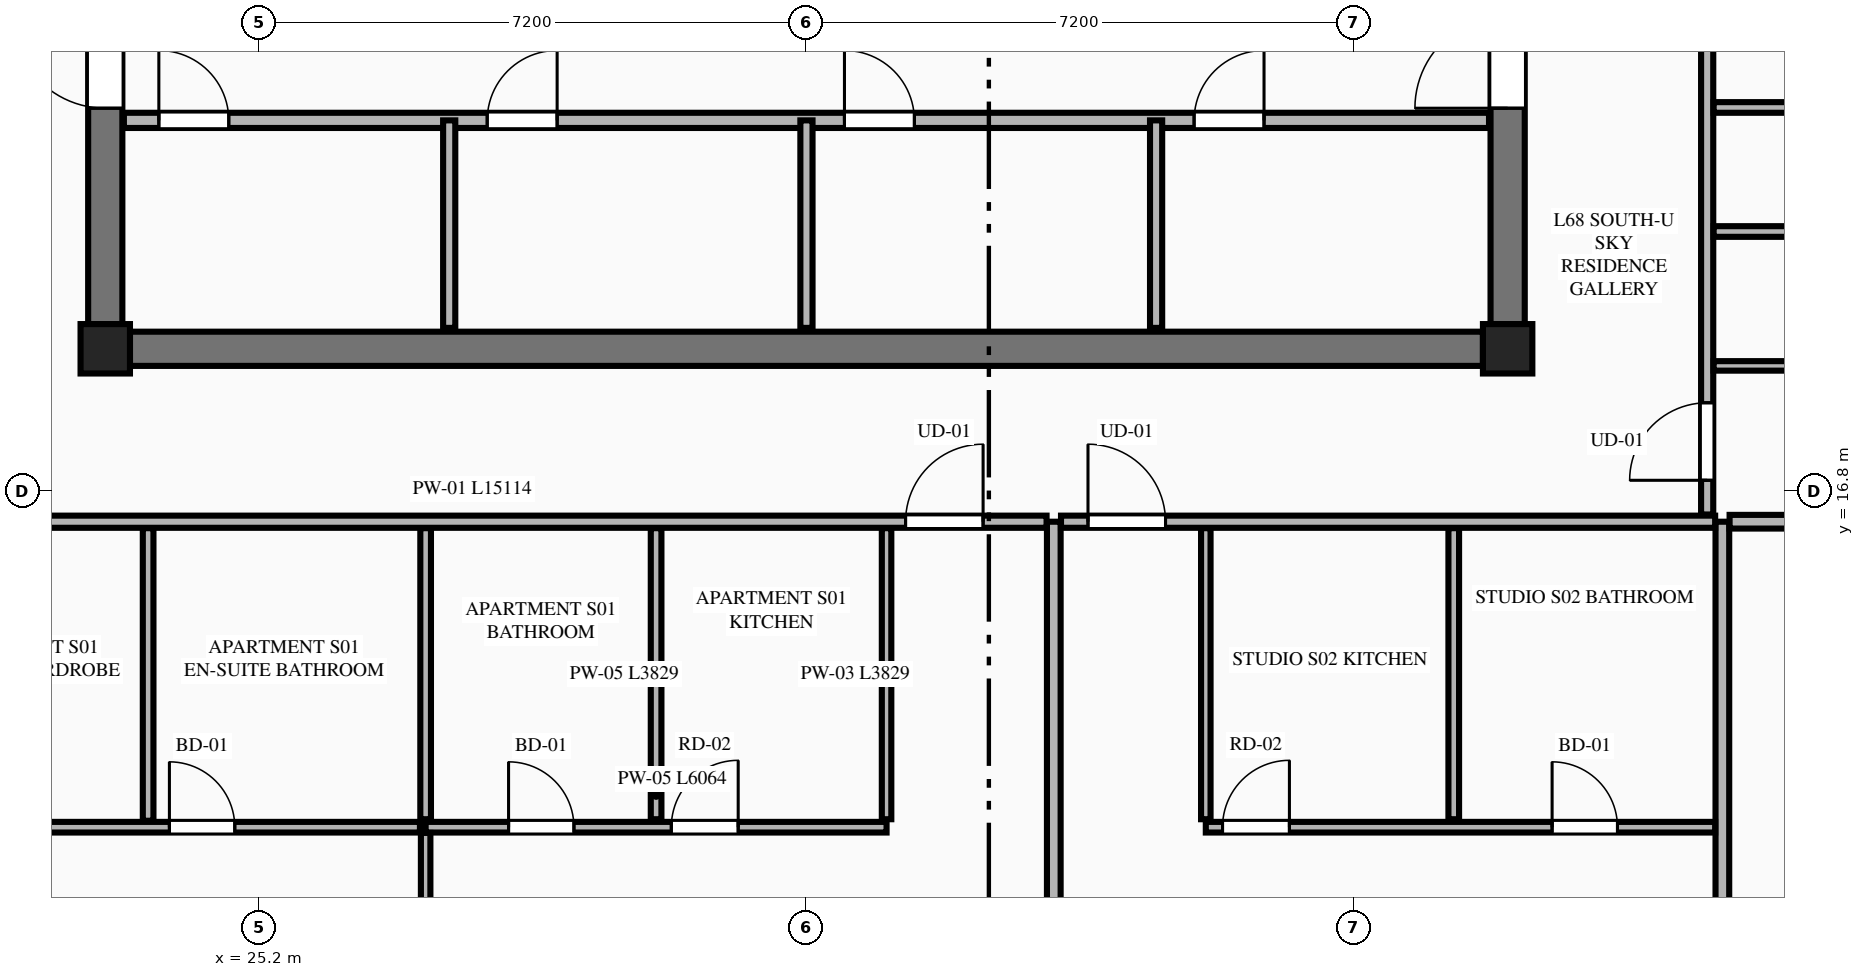
"""IFC4 building model, lengths in metres.
Left out: names, types, materials, properties, quantities, classifications, styles, units other than length and angle.
Written with IfcOpenShell. Run it as: python <this file> out.ifc"""

import sys

from ifc_helpers import new_model, si_unit, direction, frame, frame_2d, origin, origin_2d, place, context, subcontext, project, spatial, rectangle, extrude, element, fill, save


model = new_model("IFC4")
c1 = context("Model", 3, precision=1e-05, world=origin(), true_north=direction((0.0, 1.0)))
c2 = subcontext(c1, "Body", "Model", "MODEL_VIEW")
j1 = project(units=[si_unit("LENGTHUNIT", "METRE"), si_unit("PLANEANGLEUNIT", "RADIAN")], contexts=[c1])
p1 = place(None, origin())
s1 = spatial("IfcSite", under=j1, at=p1, CompositionType="ELEMENT")
p2 = place(p1, origin())
s2 = spatial("IfcBuilding", under=s1, at=p2, CompositionType="ELEMENT")
p3 = place(p2, frame((0.0, 0.0, 256.2)))
s3 = spatial("IfcBuildingStorey", under=s2, at=p3, CompositionType="ELEMENT", Elevation=256.2)
for number, where, z_axis, x_axis in (
    (1, (23.175, 18.675, 0.0), (0.0, 0.0, 1.0), (1.0, 0.0, 0.0)),
    (2, (41.625, 18.675, 0.0), (0.0, 0.0, 1.0), (1.0, 0.0, 0.0)),
):
    element("IfcColumn", number, at=place(p3, frame(where, z_axis=z_axis, x_axis=x_axis)), inside=s3, PredefinedType="COLUMN", context=c2, shape_type="SweptSolid", body=[
        extrude(rectangle(XDim=0.65, YDim=0.65, at=origin_2d()), origin(), (0.0, 0.0, 1.0), 3.65),
    ])
p4 = place(p3, frame((23.5, 18.675, 0.0), z_axis=(0.0, 0.0, 1.0), x_axis=(1.0, 0.0, 0.0)))
e3 = element("IfcWall", 3, at=p4, inside=s3, PredefinedType="SHEAR", context=c2, shape_type="SweptSolid", body=[
    extrude(rectangle(XDim=17.8, YDim=0.45, at=frame_2d((8.9, 0.0))), origin(), (0.0, 0.0, 1.0), 3.45),
])
p5 = place(p3, frame((23.175, 19.0, 0.0), z_axis=(0.0, 0.0, 1.0), x_axis=(0.0, 1.0, 0.0)))
e4 = element("IfcWall", 4, at=p5, inside=s3, PredefinedType="SHEAR", context=c2, shape_type="SweptSolid", body=[
    extrude(rectangle(XDim=13.8, YDim=0.45, at=frame_2d((6.9, 0.0))), origin(), (0.0, 0.0, 1.0), 3.45),
])
p6 = place(p5, frame((2.84, 0.0, 0.0)))
e5 = element("IfcOpeningElement", 5, at=p6, cuts=e4, PredefinedType="OPENING", context=c2, shape_type="SweptSolid", body=[
    extrude(rectangle(XDim=1.22, YDim=2.25, at=frame_2d((0.61, 1.125))), frame((0.0, 0.235, 0.0), z_axis=(0.0, -1.0, 0.0), x_axis=(1.0, 0.0, 0.0)), (0.0, 0.0, 1.0), 0.47),
])
p7 = place(p3, frame((41.625, 19.0, 0.0), z_axis=(0.0, 0.0, 1.0), x_axis=(0.0, 1.0, 0.0)))
e6 = element("IfcWall", 6, at=p7, inside=s3, PredefinedType="SHEAR", context=c2, shape_type="SweptSolid", body=[
    extrude(rectangle(XDim=13.8, YDim=0.45, at=frame_2d((6.9, 0.0))), origin(), (0.0, 0.0, 1.0), 3.45),
])
p8 = place(p7, frame((2.84, 0.0, 0.0)))
e7 = element("IfcOpeningElement", 7, at=p8, cuts=e6, PredefinedType="OPENING", context=c2, shape_type="SweptSolid", body=[
    extrude(rectangle(XDim=1.22, YDim=2.25, at=frame_2d((0.61, 1.125))), frame((0.0, 0.235, 0.0), z_axis=(0.0, -1.0, 0.0), x_axis=(1.0, 0.0, 0.0)), (0.0, 0.0, 1.0), 0.47),
])
p9 = place(p3, frame((23.42, 21.68, 0.0), z_axis=(0.0, 0.0, 1.0), x_axis=(1.0, 0.0, 0.0)))
e8 = element("IfcWall", 8, at=p9, inside=s3, PredefinedType="PLUMBINGWALL", context=c2, shape_type="SweptSolid", body=[
    extrude(rectangle(XDim=17.96, YDim=0.2, at=frame_2d((8.98, 0.0))), origin(), (0.0, 0.0, 1.0), 3.45),
])
p10 = place(p9, frame((0.46, 0.0, 0.0)))
e9 = element("IfcOpeningElement", 9, at=p10, cuts=e8, PredefinedType="OPENING", context=c2, shape_type="SweptSolid", body=[
    extrude(rectangle(XDim=0.92, YDim=2.15, at=frame_2d((0.46, 1.075))), frame((0.0, 0.11, 0.0), z_axis=(0.0, -1.0, 0.0), x_axis=(1.0, 0.0, 0.0)), (0.0, 0.0, 1.0), 0.22),
])
p11 = place(p9, frame((4.78, 0.0, 0.0)))
e10 = element("IfcOpeningElement", 10, at=p11, cuts=e8, PredefinedType="OPENING", context=c2, shape_type="SweptSolid", body=[
    extrude(rectangle(XDim=0.92, YDim=2.15, at=frame_2d((0.46, 1.075))), frame((0.0, 0.11, 0.0), z_axis=(0.0, -1.0, 0.0), x_axis=(1.0, 0.0, 0.0)), (0.0, 0.0, 1.0), 0.22),
])
p12 = place(p9, frame((9.48, 0.0, 0.0)))
e11 = element("IfcOpeningElement", 11, at=p12, cuts=e8, PredefinedType="OPENING", context=c2, shape_type="SweptSolid", body=[
    extrude(rectangle(XDim=0.92, YDim=2.15, at=frame_2d((0.46, 1.075))), frame((0.0, 0.11, 0.0), z_axis=(0.0, -1.0, 0.0), x_axis=(1.0, 0.0, 0.0)), (0.0, 0.0, 1.0), 0.22),
])
p13 = place(p9, frame((14.08, 0.0, 0.0)))
e12 = element("IfcOpeningElement", 12, at=p13, cuts=e8, PredefinedType="OPENING", context=c2, shape_type="SweptSolid", body=[
    extrude(rectangle(XDim=0.92, YDim=2.15, at=frame_2d((0.46, 1.075))), frame((0.0, 0.11, 0.0), z_axis=(0.0, -1.0, 0.0), x_axis=(1.0, 0.0, 0.0)), (0.0, 0.0, 1.0), 0.22),
])
for number, where, z_axis, x_axis in (
    (13, (27.7, 18.95, 0.0), (0.0, 0.0, 1.0), (0.0, 1.0, 0.0)),
    (14, (32.4, 18.95, 0.0), (0.0, 0.0, 1.0), (0.0, 1.0, 0.0)),
    (15, (37.0, 18.95, 0.0), (0.0, 0.0, 1.0), (0.0, 1.0, 0.0)),
):
    element("IfcWall", number, at=place(p3, frame(where, z_axis=z_axis, x_axis=x_axis)), inside=s3, PredefinedType="PARTITIONING", context=c2, shape_type="SweptSolid", body=[
        extrude(rectangle(XDim=2.73, YDim=0.16, at=frame_2d((1.365, 0.0))), origin(), (0.0, 0.0, 1.0), 3.45),
    ])
p14 = place(p3, frame((35.654, 7.405, 0.0), z_axis=(0.0, 0.0, 1.0), x_axis=(0.0, 1.0, 0.0)))
e16 = element("IfcWall", 16, at=p14, inside=s3, PredefinedType="PARTITIONING", context=c2, shape_type="SweptSolid", body=[
    extrude(rectangle(XDim=8.995, YDim=0.18, at=frame_2d((4.498, 0.0))), origin(), (0.0, 0.0, 1.0), 2.907),
])
p15 = place(p3, frame((44.45, 8.119, 0.0), z_axis=(0.0, 0.0, 1.0), x_axis=(0.0, 1.0, 0.0)))
e17 = element("IfcWall", 17, at=p15, inside=s3, PredefinedType="PARTITIONING", context=c2, shape_type="SweptSolid", body=[
    extrude(rectangle(XDim=8.281, YDim=0.18, at=frame_2d((4.141, 0.0))), origin(), (0.0, 0.0, 1.0), 3.45),
])
p16 = place(p3, frame((20.445, 16.4, 0.0), z_axis=(0.0, 0.0, 1.0), x_axis=(1.0, 0.0, 0.0)))
e18 = element("IfcWall", 18, at=p16, inside=s3, PredefinedType="PARTITIONING", context=c2, shape_type="SweptSolid", body=[
    extrude(rectangle(XDim=15.114, YDim=0.16, at=frame_2d((7.557, 0.0))), origin(), (0.0, 0.0, 1.0), 3.45),
])
p17 = place(p16, frame((13.259, 0.0, 0.0)))
e19 = element("IfcOpeningElement", 19, at=p17, cuts=e18, PredefinedType="OPENING", context=c2, shape_type="SweptSolid", body=[
    extrude(rectangle(XDim=1.02, YDim=2.25, at=frame_2d((0.51, 1.125))), frame((0.0, 0.09, 0.0), z_axis=(0.0, -1.0, 0.0), x_axis=(1.0, 0.0, 0.0)), (0.0, 0.0, 1.0), 0.18),
])
p18 = place(p3, frame((33.454, 12.486, 0.0), z_axis=(0.0, 0.0, 1.0), x_axis=(0.0, 1.0, 0.0)))
e20 = element("IfcWall", 20, at=p18, inside=s3, PredefinedType="PARTITIONING", context=c2, shape_type="SweptSolid", body=[
    extrude(rectangle(XDim=3.829, YDim=0.125, at=frame_2d((1.915, 0.0))), origin(), (0.0, 0.0, 1.0), 3.45),
])
p19 = place(p3, frame((27.39, 12.381, 0.0), z_axis=(0.0, 0.0, 1.0), x_axis=(1.0, 0.0, 0.0)))
e21 = element("IfcWall", 21, at=p19, inside=s3, PredefinedType="PLUMBINGWALL", context=c2, shape_type="SweptSolid", body=[
    extrude(rectangle(XDim=6.064, YDim=0.14, at=frame_2d((3.032, 0.0))), origin(), (0.0, 0.0, 1.0), 3.45),
])
p20 = place(p19, frame((1.091, 0.0, 0.0)))
e22 = element("IfcOpeningElement", 22, at=p20, cuts=e21, PredefinedType="OPENING", context=c2, shape_type="SweptSolid", body=[
    extrude(rectangle(XDim=0.86, YDim=2.1, at=frame_2d((0.43, 1.05))), frame((0.0, 0.08, 0.0), z_axis=(0.0, -1.0, 0.0), x_axis=(1.0, 0.0, 0.0)), (0.0, 0.0, 1.0), 0.16),
])
p21 = place(p19, frame((3.232, 0.0, 0.0)))
e23 = element("IfcOpeningElement", 23, at=p21, cuts=e21, PredefinedType="OPENING", context=c2, shape_type="SweptSolid", body=[
    extrude(rectangle(XDim=0.88, YDim=2.15, at=frame_2d((0.44, 1.075))), frame((0.0, 0.08, 0.0), z_axis=(0.0, -1.0, 0.0), x_axis=(1.0, 0.0, 0.0)), (0.0, 0.0, 1.0), 0.16),
])
p22 = place(p3, frame((20.445, 12.381, 0.0), z_axis=(0.0, 0.0, 1.0), x_axis=(1.0, 0.0, 0.0)))
e24 = element("IfcWall", 24, at=p22, inside=s3, PredefinedType="PLUMBINGWALL", context=c2, shape_type="SweptSolid", body=[
    extrude(rectangle(XDim=6.87, YDim=0.14, at=frame_2d((3.435, 0.0))), origin(), (0.0, 0.0, 1.0), 3.45),
])
p23 = place(p22, frame((0.28, 0.0, 0.0)))
e25 = element("IfcOpeningElement", 25, at=p23, cuts=e24, PredefinedType="OPENING", context=c2, shape_type="SweptSolid", body=[
    extrude(rectangle(XDim=0.88, YDim=2.15, at=frame_2d((0.44, 1.075))), frame((0.0, 0.08, 0.0), z_axis=(0.0, -1.0, 0.0), x_axis=(1.0, 0.0, 0.0)), (0.0, 0.0, 1.0), 0.16),
])
p24 = place(p22, frame((3.574, 0.0, 0.0)))
e26 = element("IfcOpeningElement", 26, at=p24, cuts=e24, PredefinedType="OPENING", context=c2, shape_type="SweptSolid", body=[
    extrude(rectangle(XDim=0.86, YDim=2.1, at=frame_2d((0.43, 1.05))), frame((0.0, 0.08, 0.0), z_axis=(0.0, -1.0, 0.0), x_axis=(1.0, 0.0, 0.0)), (0.0, 0.0, 1.0), 0.16),
])
for number, where, z_axis, x_axis in (
    (27, (30.422, 12.486, 0.0), (0.0, 0.0, 1.0), (0.0, 1.0, 0.0)),
    (28, (27.39, 12.486, 0.0), (0.0, 0.0, 1.0), (0.0, 1.0, 0.0)),
):
    element("IfcWall", number, at=place(p3, frame(where, z_axis=z_axis, x_axis=x_axis)), inside=s3, PredefinedType="PLUMBINGWALL", context=c2, shape_type="SweptSolid", body=[
        extrude(rectangle(XDim=3.829, YDim=0.14, at=frame_2d((1.915, 0.0))), origin(), (0.0, 0.0, 1.0), 3.45),
    ])
p25 = place(p3, frame((27.39, 7.315, 0.0), z_axis=(0.0, 0.0, 1.0), x_axis=(0.0, 1.0, 0.0)))
e29 = element("IfcWall", 29, at=p25, inside=s3, PredefinedType="PARTITIONING", context=c2, shape_type="SweptSolid", body=[
    extrude(rectangle(XDim=4.991, YDim=0.125, at=frame_2d((2.496, 0.0))), origin(), (0.0, 0.0, 1.0), 3.45),
])
p26 = place(p25, frame((0.35, 0.0, 0.0)))
e30 = element("IfcOpeningElement", 30, at=p26, cuts=e29, PredefinedType="OPENING", context=c2, shape_type="SweptSolid", body=[
    extrude(rectangle(XDim=0.92, YDim=2.15, at=frame_2d((0.46, 1.075))), frame((0.0, 0.073, 0.0), z_axis=(0.0, -1.0, 0.0), x_axis=(1.0, 0.0, 0.0)), (0.0, 0.0, 1.0), 0.145),
])
p27 = place(p3, frame((23.739, 12.466, 0.0), z_axis=(0.0, 0.0, 1.0), x_axis=(0.0, 1.0, 0.0)))
e31 = element("IfcWall", 31, at=p27, inside=s3, PredefinedType="PLUMBINGWALL", context=c2, shape_type="SweptSolid", body=[
    extrude(rectangle(XDim=3.849, YDim=0.14, at=frame_2d((1.924, 0.0))), origin(), (0.0, 0.0, 1.0), 3.45),
])
p28 = place(p3, frame((35.749, 16.4, 0.0), z_axis=(0.0, 0.0, 1.0), x_axis=(1.0, 0.0, 0.0)))
e32 = element("IfcWall", 32, at=p28, inside=s3, PredefinedType="PARTITIONING", context=c2, shape_type="SweptSolid", body=[
    extrude(rectangle(XDim=8.606, YDim=0.16, at=frame_2d((4.303, 0.0))), origin(), (0.0, 0.0, 1.0), 3.45),
])
p29 = place(p28, frame((0.355, 0.0, 0.0)))
e33 = element("IfcOpeningElement", 33, at=p29, cuts=e32, PredefinedType="OPENING", context=c2, shape_type="SweptSolid", body=[
    extrude(rectangle(XDim=1.02, YDim=2.25, at=frame_2d((0.51, 1.125))), frame((0.0, 0.09, 0.0), z_axis=(0.0, -1.0, 0.0), x_axis=(1.0, 0.0, 0.0)), (0.0, 0.0, 1.0), 0.18),
])
p30 = place(p3, frame((37.654, 12.486, 0.0), z_axis=(0.0, 0.0, 1.0), x_axis=(0.0, 1.0, 0.0)))
e34 = element("IfcWall", 34, at=p30, inside=s3, PredefinedType="PARTITIONING", context=c2, shape_type="SweptSolid", body=[
    extrude(rectangle(XDim=3.829, YDim=0.125, at=frame_2d((1.915, 0.0))), origin(), (0.0, 0.0, 1.0), 3.45),
])
p31 = place(p3, frame((37.654, 12.381, 0.0), z_axis=(0.0, 0.0, 1.0), x_axis=(1.0, 0.0, 0.0)))
e35 = element("IfcWall", 35, at=p31, inside=s3, PredefinedType="PLUMBINGWALL", context=c2, shape_type="SweptSolid", body=[
    extrude(rectangle(XDim=6.701, YDim=0.14, at=frame_2d((3.351, 0.0))), origin(), (0.0, 0.0, 1.0), 3.45),
])
p32 = place(p31, frame((4.556, 0.0, 0.0)))
e36 = element("IfcOpeningElement", 36, at=p32, cuts=e35, PredefinedType="OPENING", context=c2, shape_type="SweptSolid", body=[
    extrude(rectangle(XDim=0.86, YDim=2.1, at=frame_2d((0.43, 1.05))), frame((0.0, 0.08, 0.0), z_axis=(0.0, -1.0, 0.0), x_axis=(1.0, 0.0, 0.0)), (0.0, 0.0, 1.0), 0.16),
])
p33 = place(p31, frame((0.22, 0.0, 0.0)))
e37 = element("IfcOpeningElement", 37, at=p33, cuts=e35, PredefinedType="OPENING", context=c2, shape_type="SweptSolid", body=[
    extrude(rectangle(XDim=0.88, YDim=2.15, at=frame_2d((0.44, 1.075))), frame((0.0, 0.08, 0.0), z_axis=(0.0, -1.0, 0.0), x_axis=(1.0, 0.0, 0.0)), (0.0, 0.0, 1.0), 0.16),
])
p34 = place(p3, frame((40.916, 12.486, 0.0), z_axis=(0.0, 0.0, 1.0), x_axis=(0.0, 1.0, 0.0)))
e38 = element("IfcWall", 38, at=p34, inside=s3, PredefinedType="PLUMBINGWALL", context=c2, shape_type="SweptSolid", body=[
    extrude(rectangle(XDim=3.829, YDim=0.14, at=frame_2d((1.915, 0.0))), origin(), (0.0, 0.0, 1.0), 3.45),
])
p35 = place(p3, frame((44.545, 16.4, 0.0), z_axis=(0.0, 0.0, 1.0), x_axis=(1.0, 0.0, 0.0)))
e39 = element("IfcWall", 39, at=p35, inside=s3, PredefinedType="PARTITIONING", context=c2, shape_type="SweptSolid", body=[
    extrude(rectangle(XDim=4.221, YDim=0.18, at=frame_2d((2.111, 0.0))), origin(), (0.0, 0.0, 1.0), 3.45),
])
p36 = place(p3, frame((44.25, 16.495, 0.0), z_axis=(0.0, 0.0, 1.0), x_axis=(0.0, 1.0, 0.0)))
e40 = element("IfcWall", 40, at=p36, inside=s3, PredefinedType="PARTITIONING", context=c2, shape_type="SweptSolid", body=[
    extrude(rectangle(XDim=9.854, YDim=0.16, at=frame_2d((4.927, 0.0))), origin(), (0.0, 0.0, 1.0), 3.137),
])
p37 = place(p36, frame((0.45, 0.0, 0.0)))
e41 = element("IfcOpeningElement", 41, at=p37, cuts=e40, PredefinedType="OPENING", context=c2, shape_type="SweptSolid", body=[
    extrude(rectangle(XDim=1.02, YDim=2.25, at=frame_2d((0.51, 1.125))), frame((0.0, 0.09, 0.0), z_axis=(0.0, -1.0, 0.0), x_axis=(1.0, 0.0, 0.0)), (0.0, 0.0, 1.0), 0.18),
])
p38 = place(p3, frame((44.335, 18.45, 0.0), z_axis=(0.0, 0.0, 1.0), x_axis=(1.0, 0.0, 0.0)))
e42 = element("IfcWall", 42, at=p38, inside=s3, PredefinedType="PARTITIONING", context=c2, shape_type="SweptSolid", body=[
    extrude(rectangle(XDim=2.38, YDim=0.125, at=frame_2d((1.19, 0.0))), origin(), (0.0, 0.0, 1.0), 3.45),
])
for number, where, z_axis, x_axis in (
    (43, (44.335, 21.85, 0.0), (0.0, 0.0, 1.0), (1.0, 0.0, 0.0)),
    (44, (44.335, 20.218, 0.0), (0.0, 0.0, 1.0), (1.0, 0.0, 0.0)),
):
    element("IfcWall", number, at=place(p3, frame(where, z_axis=z_axis, x_axis=x_axis)), inside=s3, PredefinedType="PLUMBINGWALL", context=c2, shape_type="SweptSolid", body=[
        extrude(rectangle(XDim=2.38, YDim=0.14, at=frame_2d((1.19, 0.0))), origin(), (0.0, 0.0, 1.0), 3.45),
    ])
p39 = place(p6, origin())
e45 = element("IfcDoor", 45, at=p39, inside=s3, OperationType="SINGLE_SWING_RIGHT", PredefinedType="DOOR", context=c2, shape_type="SweptSolid", body=[
    extrude(rectangle(XDim=1.22, YDim=2.25, at=frame_2d((0.61, 1.125))), frame((0.0, 0.025, 0.0), z_axis=(0.0, -1.0, 0.0), x_axis=(1.0, 0.0, 0.0)), (0.0, 0.0, 1.0), 0.05),
])
fill(e5, e45)
p40 = place(p8, origin())
e46 = element("IfcDoor", 46, at=p40, inside=s3, OperationType="SINGLE_SWING_LEFT", PredefinedType="DOOR", context=c2, shape_type="SweptSolid", body=[
    extrude(rectangle(XDim=1.22, YDim=2.25, at=frame_2d((0.61, 1.125))), frame((0.0, 0.025, 0.0), z_axis=(0.0, -1.0, 0.0), x_axis=(1.0, 0.0, 0.0)), (0.0, 0.0, 1.0), 0.05),
])
fill(e7, e46)
p41 = place(p10, origin())
e47 = element("IfcDoor", 47, at=p41, inside=s3, OperationType="SINGLE_SWING_LEFT", PredefinedType="DOOR", context=c2, shape_type="SweptSolid", body=[
    extrude(rectangle(XDim=0.92, YDim=2.15, at=frame_2d((0.46, 1.075))), frame((0.0, 0.025, 0.0), z_axis=(0.0, -1.0, 0.0), x_axis=(1.0, 0.0, 0.0)), (0.0, 0.0, 1.0), 0.05),
])
fill(e9, e47)
p42 = place(p11, origin())
e48 = element("IfcDoor", 48, at=p42, inside=s3, OperationType="SINGLE_SWING_RIGHT", PredefinedType="DOOR", context=c2, shape_type="SweptSolid", body=[
    extrude(rectangle(XDim=0.92, YDim=2.15, at=frame_2d((0.46, 1.075))), frame((0.0, 0.025, 0.0), z_axis=(0.0, -1.0, 0.0), x_axis=(1.0, 0.0, 0.0)), (0.0, 0.0, 1.0), 0.05),
])
fill(e10, e48)
p43 = place(p12, origin())
e49 = element("IfcDoor", 49, at=p43, inside=s3, OperationType="SINGLE_SWING_LEFT", PredefinedType="DOOR", context=c2, shape_type="SweptSolid", body=[
    extrude(rectangle(XDim=0.92, YDim=2.15, at=frame_2d((0.46, 1.075))), frame((0.0, 0.025, 0.0), z_axis=(0.0, -1.0, 0.0), x_axis=(1.0, 0.0, 0.0)), (0.0, 0.0, 1.0), 0.05),
])
fill(e11, e49)
p44 = place(p13, origin())
e50 = element("IfcDoor", 50, at=p44, inside=s3, OperationType="SINGLE_SWING_RIGHT", PredefinedType="DOOR", context=c2, shape_type="SweptSolid", body=[
    extrude(rectangle(XDim=0.92, YDim=2.15, at=frame_2d((0.46, 1.075))), frame((0.0, 0.025, 0.0), z_axis=(0.0, -1.0, 0.0), x_axis=(1.0, 0.0, 0.0)), (0.0, 0.0, 1.0), 0.05),
])
fill(e12, e50)
p45 = place(p20, origin())
e51 = element("IfcDoor", 51, at=p45, inside=s3, OperationType="SINGLE_SWING_LEFT", PredefinedType="DOOR", context=c2, shape_type="SweptSolid", body=[
    extrude(rectangle(XDim=0.86, YDim=2.1, at=frame_2d((0.43, 1.05))), frame((0.0, 0.025, 0.0), z_axis=(0.0, -1.0, 0.0), x_axis=(1.0, 0.0, 0.0)), (0.0, 0.0, 1.0), 0.05),
])
fill(e22, e51)
p46 = place(p24, origin())
e52 = element("IfcDoor", 52, at=p46, inside=s3, OperationType="SINGLE_SWING_LEFT", PredefinedType="DOOR", context=c2, shape_type="SweptSolid", body=[
    extrude(rectangle(XDim=0.86, YDim=2.1, at=frame_2d((0.43, 1.05))), frame((0.0, 0.025, 0.0), z_axis=(0.0, -1.0, 0.0), x_axis=(1.0, 0.0, 0.0)), (0.0, 0.0, 1.0), 0.05),
])
fill(e26, e52)
p47 = place(p17, origin())
e53 = element("IfcDoor", 53, at=p47, inside=s3, OperationType="SINGLE_SWING_RIGHT", PredefinedType="DOOR", context=c2, shape_type="SweptSolid", body=[
    extrude(rectangle(XDim=1.02, YDim=2.25, at=frame_2d((0.51, 1.125))), frame((0.0, 0.025, 0.0), z_axis=(0.0, -1.0, 0.0), x_axis=(1.0, 0.0, 0.0)), (0.0, 0.0, 1.0), 0.05),
])
fill(e19, e53)
p48 = place(p21, origin())
e54 = element("IfcDoor", 54, at=p48, inside=s3, OperationType="SINGLE_SWING_RIGHT", PredefinedType="DOOR", context=c2, shape_type="SweptSolid", body=[
    extrude(rectangle(XDim=0.88, YDim=2.15, at=frame_2d((0.44, 1.075))), frame((0.0, 0.025, 0.0), z_axis=(0.0, -1.0, 0.0), x_axis=(1.0, 0.0, 0.0)), (0.0, 0.0, 1.0), 0.05),
])
fill(e23, e54)
p49 = place(p32, origin())
e55 = element("IfcDoor", 55, at=p49, inside=s3, OperationType="SINGLE_SWING_LEFT", PredefinedType="DOOR", context=c2, shape_type="SweptSolid", body=[
    extrude(rectangle(XDim=0.86, YDim=2.1, at=frame_2d((0.43, 1.05))), frame((0.0, 0.025, 0.0), z_axis=(0.0, -1.0, 0.0), x_axis=(1.0, 0.0, 0.0)), (0.0, 0.0, 1.0), 0.05),
])
fill(e36, e55)
p50 = place(p29, origin())
e56 = element("IfcDoor", 56, at=p50, inside=s3, OperationType="SINGLE_SWING_LEFT", PredefinedType="DOOR", context=c2, shape_type="SweptSolid", body=[
    extrude(rectangle(XDim=1.02, YDim=2.25, at=frame_2d((0.51, 1.125))), frame((0.0, 0.025, 0.0), z_axis=(0.0, -1.0, 0.0), x_axis=(1.0, 0.0, 0.0)), (0.0, 0.0, 1.0), 0.05),
])
fill(e33, e56)
p51 = place(p33, origin())
e57 = element("IfcDoor", 57, at=p51, inside=s3, OperationType="SINGLE_SWING_RIGHT", PredefinedType="DOOR", context=c2, shape_type="SweptSolid", body=[
    extrude(rectangle(XDim=0.88, YDim=2.15, at=frame_2d((0.44, 1.075))), frame((0.0, 0.025, 0.0), z_axis=(0.0, -1.0, 0.0), x_axis=(1.0, 0.0, 0.0)), (0.0, 0.0, 1.0), 0.05),
])
fill(e37, e57)
p52 = place(p37, origin())
e58 = element("IfcDoor", 58, at=p52, inside=s3, OperationType="SINGLE_SWING_LEFT", PredefinedType="DOOR", context=c2, shape_type="SweptSolid", body=[
    extrude(rectangle(XDim=1.02, YDim=2.25, at=frame_2d((0.51, 1.125))), frame((0.0, 0.025, 0.0), z_axis=(0.0, -1.0, 0.0), x_axis=(1.0, 0.0, 0.0)), (0.0, 0.0, 1.0), 0.05),
])
fill(e41, e58)
save(model, sys.argv[1])
